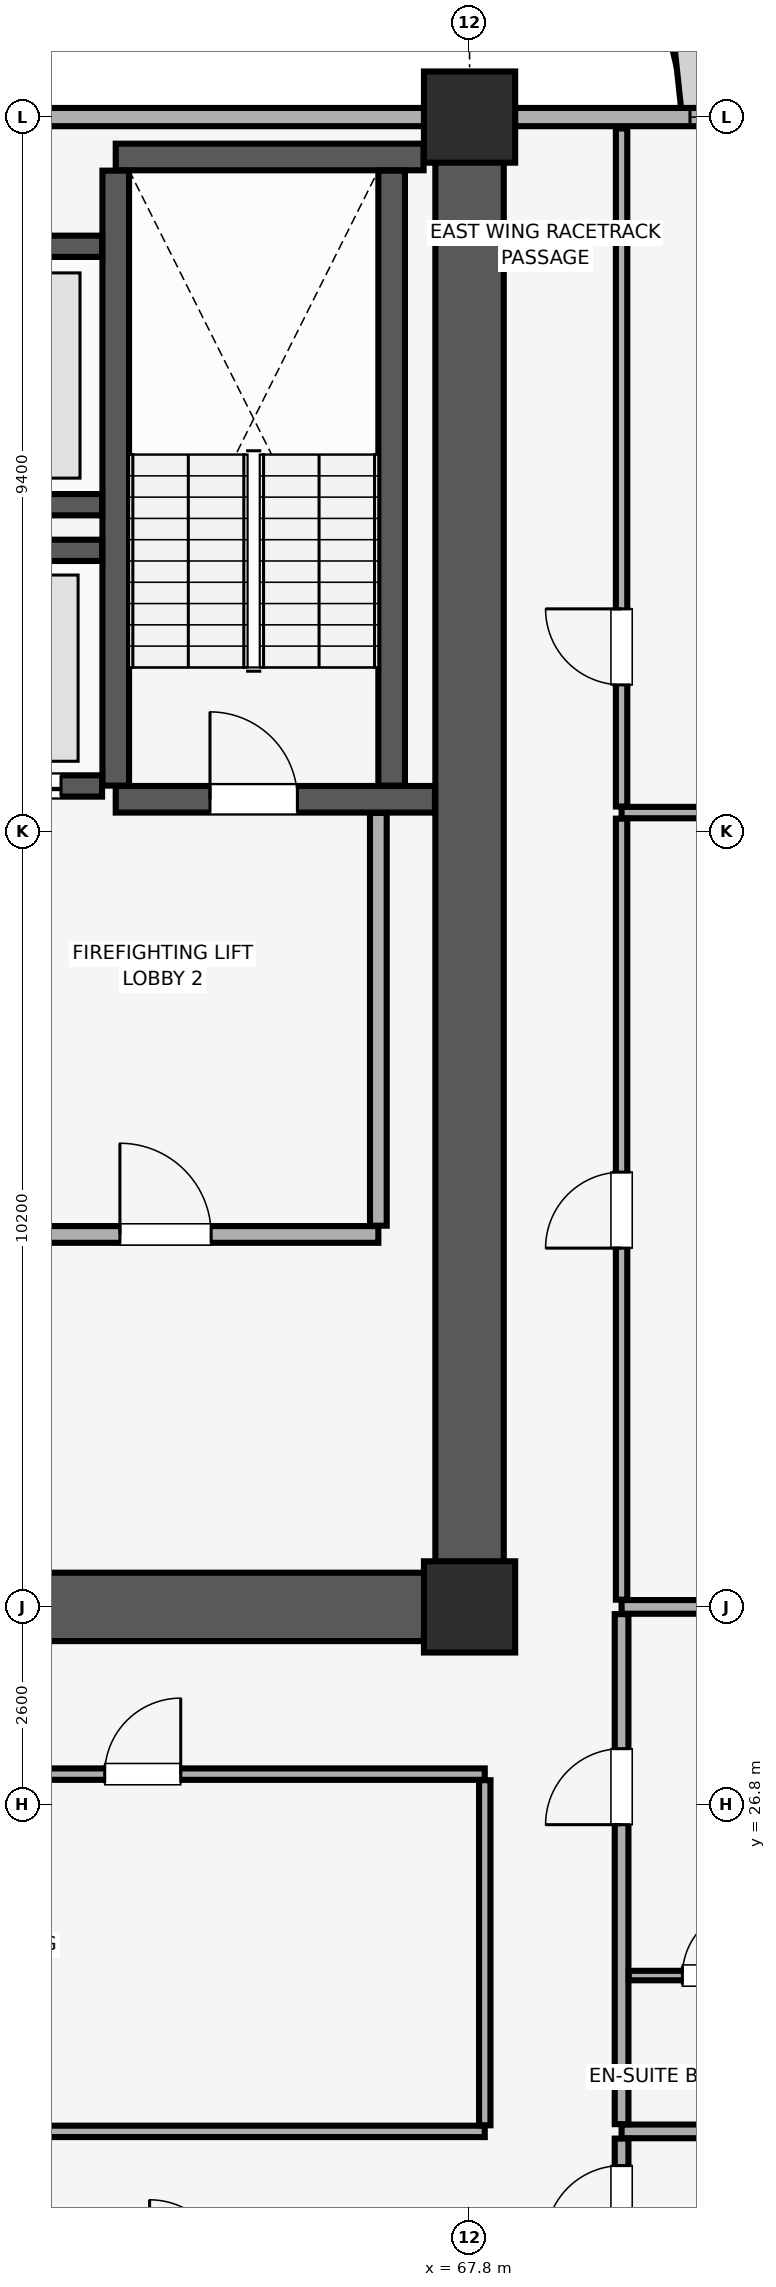
"""IFC4 building model, lengths in metres.
Left out: names, types, materials, properties, quantities, classifications, styles, units other than length and angle.
Written with IfcOpenShell. Run it as: python <this file> out.ifc"""

import sys

from ifc_helpers import new_model, si_unit, direction, frame, frame_2d, origin, origin_2d, place, context, subcontext, project, spatial, rectangle, extrude, element, fill, save


model = new_model("IFC4")
c1 = context("Model", 3, precision=1e-05, world=origin(), true_north=direction((0.0, 1.0)))
c2 = subcontext(c1, "Body", "Model", "MODEL_VIEW")
j1 = project(units=[si_unit("LENGTHUNIT", "METRE"), si_unit("PLANEANGLEUNIT", "RADIAN")], contexts=[c1])
p1 = place(None, origin())
s1 = spatial("IfcSite", under=j1, at=p1, CompositionType="ELEMENT")
p2 = place(p1, origin())
s2 = spatial("IfcBuilding", under=s1, at=p2, CompositionType="ELEMENT")
p3 = place(p2, frame((0.0, 0.0, 180.95)))
s3 = spatial("IfcBuildingStorey", under=s2, at=p3, CompositionType="ELEMENT", Elevation=180.95)
for number, where, z_axis, x_axis in (
    (1, (67.8, 29.4, 0.0), (0.0, 0.0, 1.0), (1.0, 0.0, 0.0)),
    (2, (67.8, 49.0, 0.0), (0.0, 0.0, 1.0), (1.0, 0.0, 0.0)),
):
    element("IfcColumn", number, at=place(p3, frame(where, z_axis=z_axis, x_axis=x_axis)), inside=s3, PredefinedType="COLUMN", context=c2, shape_type="SweptSolid", body=[
        extrude(rectangle(XDim=1.2, YDim=1.2, at=origin_2d()), origin(), (0.0, 0.0, 1.0), 3.45),
    ])
p4 = place(p3, frame((77.0, 49.0, 0.0), z_axis=(0.0, 0.0, 1.0), x_axis=(-1.0, 0.0, 0.0)))
e3 = element("IfcWall", 3, at=p4, inside=s3, PredefinedType="SOLIDWALL", context=c2, shape_type="SweptSolid", body=[
    extrude(rectangle(XDim=70.0, YDim=0.24, at=frame_2d((35.0, 0.0))), origin(), (0.0, 0.0, 1.0), 2.65),
])
p5 = place(p4, frame((63.7, 0.0, 0.85)))
e4 = element("IfcOpeningElement", 4, at=p5, cuts=e3, PredefinedType="OPENING", context=c2, shape_type="SweptSolid", body=[
    extrude(rectangle(XDim=3.0, YDim=1.5, at=frame_2d((1.5, 0.75))), frame((0.0, 0.13, 0.0), z_axis=(0.0, -1.0, 0.0), x_axis=(1.0, 0.0, 0.0)), (0.0, 0.0, 1.0), 0.26),
])
p6 = place(p4, frame((3.3, 0.0, 0.85)))
e5 = element("IfcOpeningElement", 5, at=p6, cuts=e3, PredefinedType="OPENING", context=c2, shape_type="SweptSolid", body=[
    extrude(rectangle(XDim=3.0, YDim=1.5, at=frame_2d((1.5, 0.75))), frame((0.0, 0.13, 0.0), z_axis=(0.0, -1.0, 0.0), x_axis=(1.0, 0.0, 0.0)), (0.0, 0.0, 1.0), 0.26),
])
p7 = place(p4, frame((49.465, 0.0, 0.9)))
e6 = element("IfcOpeningElement", 6, at=p7, cuts=e3, PredefinedType="OPENING", context=c2, shape_type="SweptSolid", body=[
    extrude(rectangle(XDim=1.5, YDim=1.4, at=frame_2d((0.75, 0.7))), frame((0.0, 0.13, 0.0), z_axis=(0.0, -1.0, 0.0), x_axis=(1.0, 0.0, 0.0)), (0.0, 0.0, 1.0), 0.26),
])
p8 = place(p4, frame((41.65, 0.0, 0.9)))
e7 = element("IfcOpeningElement", 7, at=p8, cuts=e3, PredefinedType="OPENING", context=c2, shape_type="SweptSolid", body=[
    extrude(rectangle(XDim=3.6, YDim=1.5, at=frame_2d((1.8, 0.75))), frame((0.0, 0.13, 0.0), z_axis=(0.0, -1.0, 0.0), x_axis=(1.0, 0.0, 0.0)), (0.0, 0.0, 1.0), 0.26),
])
p9 = place(p4, frame((28.25, 0.0, 0.9)))
e8 = element("IfcOpeningElement", 8, at=p9, cuts=e3, PredefinedType="OPENING", context=c2, shape_type="SweptSolid", body=[
    extrude(rectangle(XDim=1.5, YDim=1.4, at=frame_2d((0.75, 0.7))), frame((0.0, 0.13, 0.0), z_axis=(0.0, -1.0, 0.0), x_axis=(1.0, 0.0, 0.0)), (0.0, 0.0, 1.0), 0.26),
])
p10 = place(p4, frame((24.6, 0.0, 0.9)))
e9 = element("IfcOpeningElement", 9, at=p10, cuts=e3, PredefinedType="OPENING", context=c2, shape_type="SweptSolid", body=[
    extrude(rectangle(XDim=2.4, YDim=1.5, at=frame_2d((1.2, 0.75))), frame((0.0, 0.13, 0.0), z_axis=(0.0, -1.0, 0.0), x_axis=(1.0, 0.0, 0.0)), (0.0, 0.0, 1.0), 0.26),
])
p11 = place(p4, frame((20.235, 0.0, 0.9)))
e10 = element("IfcOpeningElement", 10, at=p11, cuts=e3, PredefinedType="OPENING", context=c2, shape_type="SweptSolid", body=[
    extrude(rectangle(XDim=2.4, YDim=1.5, at=frame_2d((1.2, 0.75))), frame((0.0, 0.13, 0.0), z_axis=(0.0, -1.0, 0.0), x_axis=(1.0, 0.0, 0.0)), (0.0, 0.0, 1.0), 0.26),
])
p12 = place(p3, frame((67.8, 29.4, 0.0), z_axis=(0.0, 0.0, 1.0), x_axis=(0.0, 1.0, 0.0)))
e11 = element("IfcWall", 11, at=p12, inside=s3, PredefinedType="SHEAR", context=c2, shape_type="SweptSolid", body=[
    extrude(rectangle(XDim=19.2, YDim=0.9, at=frame_2d((9.6, 0.0))), origin(), (0.0, 0.0, 1.0), 3.45),
])
p13 = place(p3, frame((60.4, 29.4, 0.0), z_axis=(0.0, 0.0, 1.0), x_axis=(1.0, 0.0, 0.0)))
e12 = element("IfcWall", 12, at=p13, inside=s3, PredefinedType="SHEAR", context=c2, shape_type="SweptSolid", body=[
    extrude(rectangle(XDim=6.945, YDim=0.9, at=frame_2d((3.473, 0.0))), origin(), (0.0, 0.0, 1.0), 3.45),
])
p14 = place(p3, frame((63.145, 40.025, 0.0), z_axis=(0.0, 0.0, 1.0), x_axis=(1.0, 0.0, 0.0)))
e13 = element("IfcWall", 13, at=p14, inside=s3, PredefinedType="SHEAR", context=c2, shape_type="SweptSolid", body=[
    extrude(rectangle(XDim=4.2, YDim=0.35, at=frame_2d((2.1, 0.0))), origin(), (0.0, 0.0, 1.0), 3.45),
])
p15 = place(p14, frame((1.24, 0.0, 0.0)))
e14 = element("IfcOpeningElement", 14, at=p15, cuts=e13, PredefinedType="OPENING", context=c2, shape_type="SweptSolid", body=[
    extrude(rectangle(XDim=1.15, YDim=2.15, at=frame_2d((0.575, 1.075))), frame((0.0, 0.185, 0.0), z_axis=(0.0, -1.0, 0.0), x_axis=(1.0, 0.0, 0.0)), (0.0, 0.0, 1.0), 0.37),
])
p16 = place(p3, frame((63.145, 48.475, 0.0), z_axis=(0.0, 0.0, 1.0), x_axis=(1.0, 0.0, 0.0)))
e15 = element("IfcWall", 15, at=p16, inside=s3, PredefinedType="SHEAR", context=c2, shape_type="SweptSolid", body=[
    extrude(rectangle(XDim=4.05, YDim=0.35, at=frame_2d((2.025, 0.0))), origin(), (0.0, 0.0, 1.0), 3.45),
])
for number, where, z_axis, x_axis in (
    (16, (63.145, 40.205, 0.0), (0.0, 0.0, 1.0), (0.0, 1.0, 0.0)),
    (17, (66.775, 40.205, 0.0), (0.0, 0.0, 1.0), (0.0, 1.0, 0.0)),
):
    element("IfcWall", number, at=place(p3, frame(where, z_axis=z_axis, x_axis=x_axis)), inside=s3, PredefinedType="SHEAR", context=c2, shape_type="SweptSolid", body=[
        extrude(rectangle(XDim=8.09, YDim=0.35, at=frame_2d((4.045, 0.0))), origin(), (0.0, 0.0, 1.0), 3.45),
    ])
p17 = place(p3, frame((60.55, 40.2, 0.0), z_axis=(0.0, 0.0, 1.0), x_axis=(1.0, 0.0, 0.0)))
e18 = element("IfcWall", 18, at=p17, inside=s3, PredefinedType="SHEAR", context=c2, shape_type="SweptSolid", body=[
    extrude(rectangle(XDim=2.415, YDim=0.28, at=frame_2d((1.208, 0.0))), origin(), (0.0, 0.0, 1.0), 3.45),
])
p18 = place(p17, frame((0.575, 0.0, 0.0)))
e19 = element("IfcOpeningElement", 19, at=p18, cuts=e18, PredefinedType="OPENING", context=c2, shape_type="SweptSolid", body=[
    extrude(rectangle(XDim=1.3, YDim=2.3, at=frame_2d((0.65, 1.15))), frame((0.0, 0.15, 0.0), z_axis=(0.0, -1.0, 0.0), x_axis=(1.0, 0.0, 0.0)), (0.0, 0.0, 1.0), 0.3),
])
for number, where, z_axis, x_axis in (
    (20, (60.55, 43.3, 0.0), (0.0, 0.0, 1.0), (1.0, 0.0, 0.0)),
    (21, (60.55, 43.9, 0.0), (0.0, 0.0, 1.0), (1.0, 0.0, 0.0)),
    (22, (60.55, 47.3, 0.0), (0.0, 0.0, 1.0), (1.0, 0.0, 0.0)),
):
    element("IfcWall", number, at=place(p3, frame(where, z_axis=z_axis, x_axis=x_axis)), inside=s3, PredefinedType="SHEAR", context=c2, shape_type="SweptSolid", body=[
        extrude(rectangle(XDim=2.415, YDim=0.28, at=frame_2d((1.208, 0.0))), origin(), (0.0, 0.0, 1.0), 3.45),
    ])
p19 = place(p3, frame((60.55, 34.3, 0.0), z_axis=(0.0, 0.0, 1.0), x_axis=(1.0, 0.0, 0.0)))
e23 = element("IfcWall", 23, at=p19, inside=s3, PredefinedType="PARTITIONING", context=c2, shape_type="SweptSolid", body=[
    extrude(rectangle(XDim=6.05, YDim=0.22, at=frame_2d((3.025, 0.0))), origin(), (0.0, 0.0, 1.0), 3.45),
])
p20 = place(p19, frame((2.65, 0.0, 0.0)))
e24 = element("IfcOpeningElement", 24, at=p20, cuts=e23, PredefinedType="OPENING", context=c2, shape_type="SweptSolid", body=[
    extrude(rectangle(XDim=1.2, YDim=2.15, at=frame_2d((0.6, 1.075))), frame((0.0, 0.12, 0.0), z_axis=(0.0, -1.0, 0.0), x_axis=(1.0, 0.0, 0.0)), (0.0, 0.0, 1.0), 0.24),
])
p21 = place(p3, frame((66.6, 34.415, 0.0), z_axis=(0.0, 0.0, 1.0), x_axis=(0.0, 1.0, 0.0)))
e25 = element("IfcWall", 25, at=p21, inside=s3, PredefinedType="PARTITIONING", context=c2, shape_type="SweptSolid", body=[
    extrude(rectangle(XDim=5.43, YDim=0.22, at=frame_2d((2.715, 0.0))), origin(), (0.0, 0.0, 1.0), 3.45),
])
p22 = place(p3, frame((69.8, 22.5, 0.0), z_axis=(0.0, 0.0, 1.0), x_axis=(1.0, 0.0, 0.0)))
e26 = element("IfcWall", 26, at=p22, inside=s3, PredefinedType="PARTITIONING", context=c2, shape_type="SweptSolid", body=[
    extrude(rectangle(XDim=11.05, YDim=0.18, at=frame_2d((5.525, 0.0))), origin(), (0.0, 0.0, 1.0), 3.45),
])
p23 = place(p3, frame((69.8, 20.695, 0.0), z_axis=(0.0, 0.0, 1.0), x_axis=(0.0, 1.0, 0.0)))
e27 = element("IfcWall", 27, at=p23, inside=s3, PredefinedType="PARTITIONING", context=c2, shape_type="SweptSolid", body=[
    extrude(rectangle(XDim=1.71, YDim=0.18, at=frame_2d((0.855, 0.0))), origin(), (0.0, 0.0, 1.0), 3.45),
])
p24 = place(p23, frame((0.355, 0.0, 0.0)))
e28 = element("IfcOpeningElement", 28, at=p24, cuts=e27, PredefinedType="OPENING", context=c2, shape_type="SweptSolid", body=[
    extrude(rectangle(XDim=1.0, YDim=2.15, at=frame_2d((0.5, 1.075))), frame((0.0, 0.1, 0.0), z_axis=(0.0, -1.0, 0.0), x_axis=(1.0, 0.0, 0.0)), (0.0, 0.0, 1.0), 0.2),
])
p25 = place(p3, frame((69.8, 29.4, 0.0), z_axis=(0.0, 0.0, 1.0), x_axis=(1.0, 0.0, 0.0)))
e29 = element("IfcWall", 29, at=p25, inside=s3, PredefinedType="PARTITIONING", context=c2, shape_type="SweptSolid", body=[
    extrude(rectangle(XDim=11.05, YDim=0.18, at=frame_2d((5.525, 0.0))), origin(), (0.0, 0.0, 1.0), 2.54),
])
p26 = place(p3, frame((69.8, 22.595, 0.0), z_axis=(0.0, 0.0, 1.0), x_axis=(0.0, 1.0, 0.0)))
e30 = element("IfcWall", 30, at=p26, inside=s3, PredefinedType="PARTITIONING", context=c2, shape_type="SweptSolid", body=[
    extrude(rectangle(XDim=6.71, YDim=0.18, at=frame_2d((3.355, 0.0))), origin(), (0.0, 0.0, 1.0), 3.45),
])
p27 = place(p26, frame((3.94, 0.0, 0.0)))
e31 = element("IfcOpeningElement", 31, at=p27, cuts=e30, PredefinedType="OPENING", context=c2, shape_type="SweptSolid", body=[
    extrude(rectangle(XDim=1.0, YDim=2.15, at=frame_2d((0.5, 1.075))), frame((0.0, 0.1, 0.0), z_axis=(0.0, -1.0, 0.0), x_axis=(1.0, 0.0, 0.0)), (0.0, 0.0, 1.0), 0.2),
])
p28 = place(p3, frame((69.895, 24.55, 0.0), z_axis=(0.0, 0.0, 1.0), x_axis=(1.0, 0.0, 0.0)))
e32 = element("IfcWall", 32, at=p28, inside=s3, PredefinedType="PARTITIONING", context=c2, shape_type="SweptSolid", body=[
    extrude(rectangle(XDim=2.405, YDim=0.125, at=frame_2d((1.203, 0.0))), origin(), (0.0, 0.0, 1.0), 3.45),
])
p29 = place(p28, frame((0.705, 0.0, 0.0)))
e33 = element("IfcOpeningElement", 33, at=p29, cuts=e32, PredefinedType="OPENING", context=c2, shape_type="SweptSolid", body=[
    extrude(rectangle(XDim=0.9, YDim=2.1, at=frame_2d((0.45, 1.05))), frame((0.0, 0.073, 0.0), z_axis=(0.0, -1.0, 0.0), x_axis=(1.0, 0.0, 0.0)), (0.0, 0.0, 1.0), 0.145),
])
p30 = place(p3, frame((59.0, 22.5, 0.0), z_axis=(0.0, 0.0, 1.0), x_axis=(1.0, 0.0, 0.0)))
e34 = element("IfcWall", 34, at=p30, inside=s3, PredefinedType="PARTITIONING", context=c2, shape_type="SweptSolid", body=[
    extrude(rectangle(XDim=9.0, YDim=0.15, at=frame_2d((4.5, 0.0))), origin(), (0.0, 0.0, 1.0), 3.45),
])
p31 = place(p3, frame((59.0, 27.2, 0.0), z_axis=(0.0, 0.0, 1.0), x_axis=(1.0, 0.0, 0.0)))
e35 = element("IfcWall", 35, at=p31, inside=s3, PredefinedType="PARTITIONING", context=c2, shape_type="SweptSolid", body=[
    extrude(rectangle(XDim=9.0, YDim=0.15, at=frame_2d((4.5, 0.0))), origin(), (0.0, 0.0, 1.0), 3.45),
])
p32 = place(p31, frame((4.0, 0.0, 0.0)))
e36 = element("IfcOpeningElement", 36, at=p32, cuts=e35, PredefinedType="OPENING", context=c2, shape_type="SweptSolid", body=[
    extrude(rectangle(XDim=1.0, YDim=2.15, at=frame_2d((0.5, 1.075))), frame((0.0, 0.085, 0.0), z_axis=(0.0, -1.0, 0.0), x_axis=(1.0, 0.0, 0.0)), (0.0, 0.0, 1.0), 0.17),
])
p33 = place(p3, frame((68.0, 22.58, 0.0), z_axis=(0.0, 0.0, 1.0), x_axis=(0.0, 1.0, 0.0)))
e37 = element("IfcWall", 37, at=p33, inside=s3, PredefinedType="PARTITIONING", context=c2, shape_type="SweptSolid", body=[
    extrude(rectangle(XDim=4.54, YDim=0.15, at=frame_2d((2.27, 0.0))), origin(), (0.0, 0.0, 1.0), 2.95),
])
p34 = place(p3, frame((69.8, 39.85, 0.0), z_axis=(0.0, 0.0, 1.0), x_axis=(1.0, 0.0, 0.0)))
e38 = element("IfcWall", 38, at=p34, inside=s3, PredefinedType="PARTITIONING", context=c2, shape_type="SweptSolid", body=[
    extrude(rectangle(XDim=11.05, YDim=0.15, at=frame_2d((5.525, 0.0))), origin(), (0.0, 0.0, 1.0), 3.45),
])
p35 = place(p3, frame((69.8, 29.495, 0.0), z_axis=(0.0, 0.0, 1.0), x_axis=(0.0, 1.0, 0.0)))
e39 = element("IfcWall", 39, at=p35, inside=s3, PredefinedType="PARTITIONING", context=c2, shape_type="SweptSolid", body=[
    extrude(rectangle(XDim=10.275, YDim=0.15, at=frame_2d((5.137, 0.0))), origin(), (0.0, 0.0, 1.0), 3.45),
])
p36 = place(p35, frame((4.625, 0.0, 0.0)))
e40 = element("IfcOpeningElement", 40, at=p36, cuts=e39, PredefinedType="OPENING", context=c2, shape_type="SweptSolid", body=[
    extrude(rectangle(XDim=1.0, YDim=2.15, at=frame_2d((0.5, 1.075))), frame((0.0, 0.085, 0.0), z_axis=(0.0, -1.0, 0.0), x_axis=(1.0, 0.0, 0.0)), (0.0, 0.0, 1.0), 0.17),
])
p37 = place(p3, frame((69.8, 39.93, 0.0), z_axis=(0.0, 0.0, 1.0), x_axis=(0.0, 1.0, 0.0)))
e41 = element("IfcWall", 41, at=p37, inside=s3, PredefinedType="PARTITIONING", context=c2, shape_type="SweptSolid", body=[
    extrude(rectangle(XDim=8.92, YDim=0.15, at=frame_2d((4.46, 0.0))), origin(), (0.0, 0.0, 1.0), 3.45),
])
p38 = place(p37, frame((1.6, 0.0, 0.0)))
e42 = element("IfcOpeningElement", 42, at=p38, cuts=e41, PredefinedType="OPENING", context=c2, shape_type="SweptSolid", body=[
    extrude(rectangle(XDim=1.0, YDim=2.15, at=frame_2d((0.5, 1.075))), frame((0.0, 0.085, 0.0), z_axis=(0.0, -1.0, 0.0), x_axis=(1.0, 0.0, 0.0)), (0.0, 0.0, 1.0), 0.17),
])
p39 = place(p6, origin())
e43 = element("IfcWindow", 43, at=p39, inside=s3, PartitioningType="SINGLE_PANEL", PredefinedType="WINDOW", context=c2, shape_type="SweptSolid", body=[
    extrude(rectangle(XDim=3.0, YDim=1.5, at=frame_2d((1.5, 0.75))), frame((0.0, 0.03, 0.0), z_axis=(0.0, -1.0, 0.0), x_axis=(1.0, 0.0, 0.0)), (0.0, 0.0, 1.0), 0.06),
])
fill(e5, e43)
p40 = place(p15, origin())
e44 = element("IfcDoor", 44, at=p40, inside=s3, OperationType="SINGLE_SWING_LEFT", PredefinedType="DOOR", context=c2, shape_type="SweptSolid", body=[
    extrude(rectangle(XDim=1.15, YDim=2.15, at=frame_2d((0.575, 1.075))), frame((0.0, 0.025, 0.0), z_axis=(0.0, -1.0, 0.0), x_axis=(1.0, 0.0, 0.0)), (0.0, 0.0, 1.0), 0.05),
])
fill(e14, e44)
p41 = place(p18, origin())
e45 = element("IfcDoor", 45, at=p41, inside=s3, OperationType="DOUBLE_DOOR_SLIDING", PredefinedType="DOOR", context=c2, shape_type="SweptSolid", body=[
    extrude(rectangle(XDim=1.3, YDim=2.3, at=frame_2d((0.65, 1.15))), frame((0.0, 0.025, 0.0), z_axis=(0.0, -1.0, 0.0), x_axis=(1.0, 0.0, 0.0)), (0.0, 0.0, 1.0), 0.05),
])
fill(e19, e45)
p42 = place(p20, origin())
e46 = element("IfcDoor", 46, at=p42, inside=s3, OperationType="SINGLE_SWING_LEFT", PredefinedType="DOOR", context=c2, shape_type="SweptSolid", body=[
    extrude(rectangle(XDim=1.2, YDim=2.15, at=frame_2d((0.6, 1.075))), frame((0.0, 0.025, 0.0), z_axis=(0.0, -1.0, 0.0), x_axis=(1.0, 0.0, 0.0)), (0.0, 0.0, 1.0), 0.05),
])
fill(e24, e46)
p43 = place(p24, origin())
e47 = element("IfcDoor", 47, at=p43, inside=s3, OperationType="SINGLE_SWING_LEFT", PredefinedType="DOOR", context=c2, shape_type="SweptSolid", body=[
    extrude(rectangle(XDim=1.0, YDim=2.15, at=frame_2d((0.5, 1.075))), frame((0.0, 0.025, 0.0), z_axis=(0.0, -1.0, 0.0), x_axis=(1.0, 0.0, 0.0)), (0.0, 0.0, 1.0), 0.05),
])
fill(e28, e47)
p44 = place(p27, origin())
e48 = element("IfcDoor", 48, at=p44, inside=s3, OperationType="SINGLE_SWING_LEFT", PredefinedType="DOOR", context=c2, shape_type="SweptSolid", body=[
    extrude(rectangle(XDim=1.0, YDim=2.15, at=frame_2d((0.5, 1.075))), frame((0.0, 0.025, 0.0), z_axis=(0.0, -1.0, 0.0), x_axis=(1.0, 0.0, 0.0)), (0.0, 0.0, 1.0), 0.05),
])
fill(e31, e48)
p45 = place(p29, origin())
e49 = element("IfcDoor", 49, at=p45, inside=s3, OperationType="SINGLE_SWING_RIGHT", PredefinedType="DOOR", context=c2, shape_type="SweptSolid", body=[
    extrude(rectangle(XDim=0.9, YDim=2.1, at=frame_2d((0.45, 1.05))), frame((0.0, 0.025, 0.0), z_axis=(0.0, -1.0, 0.0), x_axis=(1.0, 0.0, 0.0)), (0.0, 0.0, 1.0), 0.05),
])
fill(e33, e49)
p46 = place(p32, origin())
e50 = element("IfcDoor", 50, at=p46, inside=s3, OperationType="SINGLE_SWING_RIGHT", PredefinedType="DOOR", context=c2, shape_type="SweptSolid", body=[
    extrude(rectangle(XDim=1.0, YDim=2.15, at=frame_2d((0.5, 1.075))), frame((0.0, 0.025, 0.0), z_axis=(0.0, -1.0, 0.0), x_axis=(1.0, 0.0, 0.0)), (0.0, 0.0, 1.0), 0.05),
])
fill(e36, e50)
p47 = place(p36, origin())
e51 = element("IfcDoor", 51, at=p47, inside=s3, OperationType="SINGLE_SWING_LEFT", PredefinedType="DOOR", context=c2, shape_type="SweptSolid", body=[
    extrude(rectangle(XDim=1.0, YDim=2.15, at=frame_2d((0.5, 1.075))), frame((0.0, 0.025, 0.0), z_axis=(0.0, -1.0, 0.0), x_axis=(1.0, 0.0, 0.0)), (0.0, 0.0, 1.0), 0.05),
])
fill(e40, e51)
p48 = place(p38, origin())
e52 = element("IfcDoor", 52, at=p48, inside=s3, OperationType="SINGLE_SWING_RIGHT", PredefinedType="DOOR", context=c2, shape_type="SweptSolid", body=[
    extrude(rectangle(XDim=1.0, YDim=2.15, at=frame_2d((0.5, 1.075))), frame((0.0, 0.025, 0.0), z_axis=(0.0, -1.0, 0.0), x_axis=(1.0, 0.0, 0.0)), (0.0, 0.0, 1.0), 0.05),
])
fill(e42, e52)
save(model, sys.argv[1])
